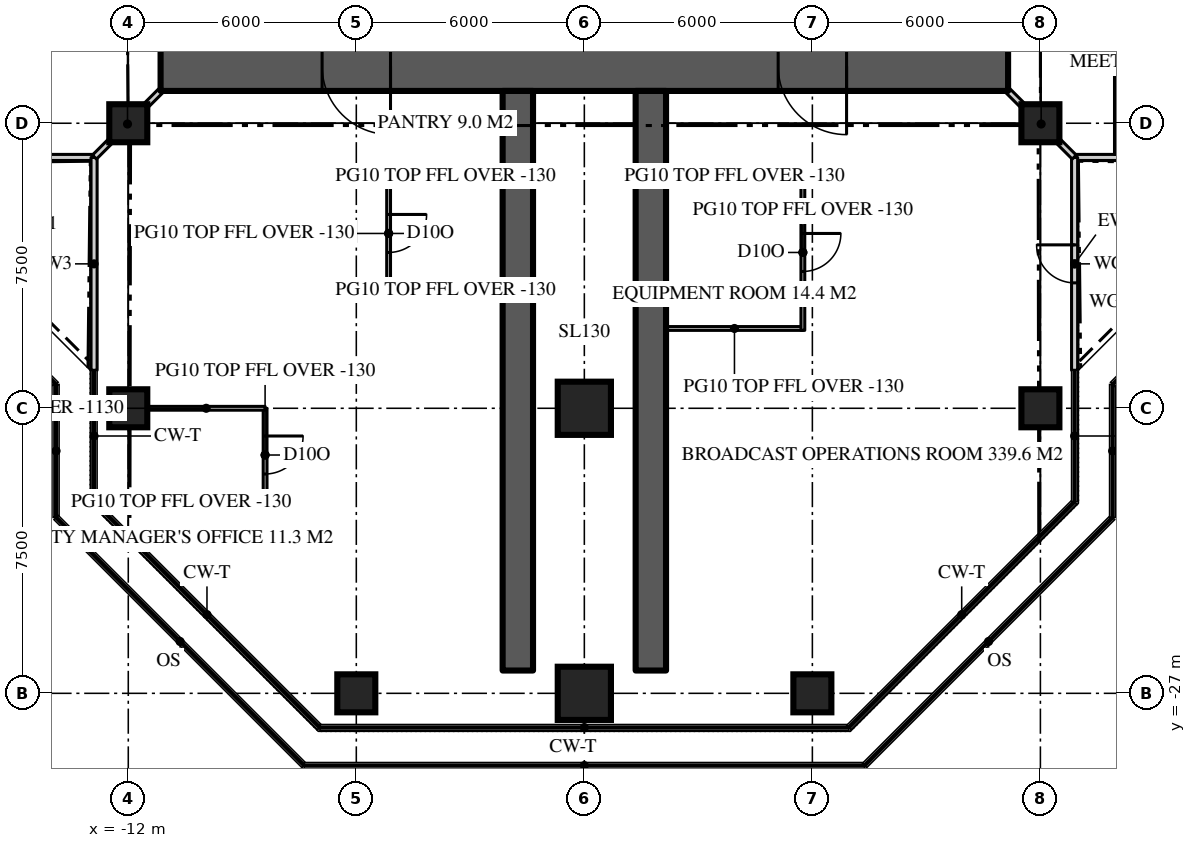
"""IFC4 building model, lengths in metres.
Left out: names, types, materials, properties, quantities, classifications, styles, units other than length and angle.
Written with IfcOpenShell. Run it as: python <this file> out.ifc"""

import sys

from ifc_helpers import new_model, si_unit, direction, frame, frame_2d, origin, origin_2d, place, context, subcontext, project, spatial, rectangle, extrude, element, fill, save


model = new_model("IFC4")
c1 = context("Model", 3, precision=1e-05, world=origin(), true_north=direction((0.0, 1.0)))
c2 = subcontext(c1, "Body", "Model", "MODEL_VIEW")
j1 = project(units=[si_unit("LENGTHUNIT", "METRE"), si_unit("PLANEANGLEUNIT", "RADIAN")], contexts=[c1])
p1 = place(None, origin())
s1 = spatial("IfcSite", under=j1, at=p1, CompositionType="ELEMENT")
p2 = place(p1, origin())
s2 = spatial("IfcBuilding", under=s1, at=p2, CompositionType="ELEMENT")
p3 = place(p2, frame((0.0, 0.0, 267.3)))
s3 = spatial("IfcBuildingStorey", under=s2, at=p3, CompositionType="ELEMENT", Elevation=267.3)
p4 = place(p3, frame((11.15, -10.5, 0.0), z_axis=(0.0, 0.0, 1.0), x_axis=(-1.0, 0.0, 0.0)))
e1 = element("IfcWall", 1, at=p4, inside=s3, PredefinedType="SHEAR", context=c2, shape_type="SweptSolid", body=[
    extrude(rectangle(XDim=22.3, YDim=1.3, at=frame_2d((11.15, 0.0))), origin(), (0.0, 0.0, 1.0), 3.9),
])
p5 = place(p4, frame((16.25, 0.0, 0.0)))
e2 = element("IfcOpeningElement", 2, at=p5, cuts=e1, PredefinedType="OPENING", context=c2, shape_type="SweptSolid", body=[
    extrude(rectangle(XDim=1.8, YDim=2.2, at=frame_2d((0.9, 1.1))), frame((0.0, 0.66, 0.0), z_axis=(0.0, -1.0, 0.0), x_axis=(1.0, 0.0, 0.0)), (0.0, 0.0, 1.0), 1.32),
])
p6 = place(p4, frame((4.25, 0.0, 0.0)))
e3 = element("IfcOpeningElement", 3, at=p6, cuts=e1, PredefinedType="OPENING", context=c2, shape_type="SweptSolid", body=[
    extrude(rectangle(XDim=1.8, YDim=2.2, at=frame_2d((0.9, 1.1))), frame((0.0, 0.66, 0.0), z_axis=(0.0, -1.0, 0.0), x_axis=(1.0, 0.0, 0.0)), (0.0, 0.0, 1.0), 1.32),
])
for number, where, z_axis, x_axis in (
    (4, (-1.75, -11.15, 0.0), (0.0, 0.0, 1.0), (0.0, -1.0, 0.0)),
    (5, (1.75, -11.15, 0.0), (0.0, 0.0, 1.0), (0.0, -1.0, 0.0)),
):
    element("IfcWall", number, at=place(p3, frame(where, z_axis=z_axis, x_axis=x_axis)), inside=s3, PredefinedType="SHEAR", context=c2, shape_type="SweptSolid", body=[
        extrude(rectangle(XDim=15.25, YDim=0.8, at=frame_2d((7.625, 0.0))), origin(), (0.0, 0.0, 1.0), 3.9),
    ])
p7 = place(p3, frame((-6.0, -27.0, 0.0), z_axis=(0.0, 0.0, 1.0), x_axis=(1.0, 0.0, 0.0)))
e6 = element("IfcColumn", 6, at=p7, inside=s3, PredefinedType="COLUMN", context=c2, shape_type="SweptSolid", body=[
    extrude(rectangle(XDim=1.0, YDim=1.0, at=origin_2d()), origin(), (0.0, 0.0, 1.0), 3.9),
])
p8 = place(p3, frame((0.0, -27.0, 0.0), z_axis=(0.0, 0.0, 1.0), x_axis=(1.0, 0.0, 0.0)))
e7 = element("IfcColumn", 7, at=p8, inside=s3, PredefinedType="COLUMN", context=c2, shape_type="SweptSolid", body=[
    extrude(rectangle(XDim=1.4, YDim=1.4, at=origin_2d()), origin(), (0.0, 0.0, 1.0), 3.9),
])
for number, where, z_axis, x_axis in (
    (8, (6.0, -27.0, 0.0), (0.0, 0.0, 1.0), (1.0, 0.0, 0.0)),
    (9, (-12.0, -19.5, 0.0), (0.0, 0.0, 1.0), (1.0, 0.0, 0.0)),
):
    element("IfcColumn", number, at=place(p3, frame(where, z_axis=z_axis, x_axis=x_axis)), inside=s3, PredefinedType="COLUMN", context=c2, shape_type="SweptSolid", body=[
        extrude(rectangle(XDim=1.0, YDim=1.0, at=origin_2d()), origin(), (0.0, 0.0, 1.0), 3.9),
    ])
p9 = place(p3, frame((0.0, -19.5, 0.0), z_axis=(0.0, 0.0, 1.0), x_axis=(1.0, 0.0, 0.0)))
e10 = element("IfcColumn", 10, at=p9, inside=s3, PredefinedType="COLUMN", context=c2, shape_type="SweptSolid", body=[
    extrude(rectangle(XDim=1.4, YDim=1.4, at=origin_2d()), origin(), (0.0, 0.0, 1.0), 3.9),
])
for number, where, z_axis, x_axis in (
    (11, (12.0, -19.5, 0.0), (0.0, 0.0, 1.0), (1.0, 0.0, 0.0)),
    (12, (-12.0, -12.0, 0.0), (0.0, 0.0, 1.0), (1.0, 0.0, 0.0)),
    (13, (12.0, -12.0, 0.0), (0.0, 0.0, 1.0), (1.0, 0.0, 0.0)),
):
    element("IfcColumn", number, at=place(p3, frame(where, z_axis=z_axis, x_axis=x_axis)), inside=s3, PredefinedType="COLUMN", context=c2, shape_type="SweptSolid", body=[
        extrude(rectangle(XDim=1.0, YDim=1.0, at=origin_2d()), origin(), (0.0, 0.0, 1.0), 3.9),
    ])
p10 = place(p3, frame((12.9, -12.9, 0.0), z_axis=(0.0, 0.0, 1.0), x_axis=(1.0, 0.0, 0.0)))
e14 = element("IfcWall", 14, at=p10, inside=s3, PredefinedType="SOLIDWALL", context=c2, shape_type="SweptSolid", body=[
    extrude(rectangle(XDim=5.6, YDim=0.16, at=frame_2d((2.8, 0.0))), origin(), (0.0, 0.0, 1.0), 3.77),
])
p11 = place(p3, frame((-18.5, -12.9, 0.0), z_axis=(0.0, 0.0, 1.0), x_axis=(1.0, 0.0, 0.0)))
e15 = element("IfcWall", 15, at=p11, inside=s3, PredefinedType="SOLIDWALL", context=c2, shape_type="SweptSolid", body=[
    extrude(rectangle(XDim=5.6, YDim=0.16, at=frame_2d((2.8, 0.0))), origin(), (0.0, 0.0, 1.0), 3.77),
])
p12 = place(p11, frame((2.3, 0.0, 0.0)))
e16 = element("IfcOpeningElement", 16, at=p12, cuts=e15, PredefinedType="OPENING", context=c2, shape_type="SweptSolid", body=[
    extrude(rectangle(XDim=1.0, YDim=2.2, at=frame_2d((0.5, 1.1))), frame((0.0, 0.09, 0.0), z_axis=(0.0, -1.0, 0.0), x_axis=(1.0, 0.0, 0.0)), (0.0, 0.0, 1.0), 0.18),
])
p13 = place(p3, frame((-12.9, -12.9, 0.0), z_axis=(0.0, 0.0, 1.0), x_axis=(0.0, -1.0, 0.0)))
e17 = element("IfcWall", 17, at=p13, inside=s3, PredefinedType="SOLIDWALL", context=c2, shape_type="SweptSolid", body=[
    extrude(rectangle(XDim=5.6, YDim=0.16, at=frame_2d((2.8, 0.0))), origin(), (0.0, 0.0, 1.0), 3.77),
])
p14 = place(p3, frame((12.9, -18.5, 0.0), z_axis=(0.0, 0.0, 1.0), x_axis=(0.0, 1.0, 0.0)))
e18 = element("IfcWall", 18, at=p14, inside=s3, PredefinedType="SOLIDWALL", context=c2, shape_type="SweptSolid", body=[
    extrude(rectangle(XDim=5.6, YDim=0.16, at=frame_2d((2.8, 0.0))), origin(), (0.0, 0.0, 1.0), 3.77),
])
p15 = place(p14, frame((2.3, 0.0, 0.0)))
e19 = element("IfcOpeningElement", 19, at=p15, cuts=e18, PredefinedType="OPENING", context=c2, shape_type="SweptSolid", body=[
    extrude(rectangle(XDim=1.0, YDim=2.2, at=frame_2d((0.5, 1.1))), frame((0.0, 0.09, 0.0), z_axis=(0.0, -1.0, 0.0), x_axis=(1.0, 0.0, 0.0)), (0.0, 0.0, 1.0), 0.18),
])
p16 = place(p3, frame((14.0, -4.0, 0.0), z_axis=(0.0, 0.0, 1.0), x_axis=(0.0, -1.0, 0.0)))
e20 = element("IfcWall", 20, at=p16, inside=s3, PredefinedType="PARTITIONING", context=c2, shape_type="SweptSolid", body=[
    extrude(rectangle(XDim=8.82, YDim=0.1, at=frame_2d((4.41, 0.0))), origin(), (0.0, 0.0, 1.0), 3.18),
])
p17 = place(p3, frame((-8.4, -19.5, 0.0), z_axis=(0.0, 0.0, 1.0), x_axis=(0.0, -1.0, 0.0)))
e21 = element("IfcWall", 21, at=p17, inside=s3, PredefinedType="PARTITIONING", context=c2, shape_type="SweptSolid", body=[
    extrude(rectangle(XDim=2.459, YDim=0.1, at=frame_2d((1.229, 0.0))), origin(), (0.0, 0.0, 1.0), 3.77),
])
p18 = place(p17, frame((0.729, 0.0, 0.0)))
e22 = element("IfcOpeningElement", 22, at=p18, cuts=e21, PredefinedType="OPENING", context=c2, shape_type="SweptSolid", body=[
    extrude(rectangle(XDim=1.0, YDim=2.2, at=frame_2d((0.5, 1.1))), frame((0.0, 0.06, 0.0), z_axis=(0.0, -1.0, 0.0), x_axis=(1.0, 0.0, 0.0)), (0.0, 0.0, 1.0), 0.12),
])
p19 = place(p3, frame((-8.4, -19.5, 0.0), z_axis=(0.0, 0.0, 1.0), x_axis=(-1.0, 0.0, 0.0)))
e23 = element("IfcWall", 23, at=p19, inside=s3, PredefinedType="PARTITIONING", context=c2, shape_type="SweptSolid", body=[
    extrude(rectangle(XDim=3.1, YDim=0.1, at=frame_2d((1.55, 0.0))), origin(), (0.0, 0.0, 1.0), 2.77),
])
p20 = place(p3, frame((-8.4, -21.959, 0.0), z_axis=(0.0, 0.0, 1.0), x_axis=(-1.0, 0.0, 0.0)))
e24 = element("IfcWall", 24, at=p20, inside=s3, PredefinedType="PARTITIONING", context=c2, shape_type="SweptSolid", body=[
    extrude(rectangle(XDim=4.42, YDim=0.1, at=frame_2d((2.21, 0.0))), origin(), (0.0, 0.0, 1.0), 3.77),
])
for number, where, z_axis, x_axis in (
    (25, (2.15, -13.4, 0.0), (0.0, 0.0, 1.0), (1.0, 0.0, 0.0)),
    (26, (2.15, -17.4, 0.0), (0.0, 0.0, 1.0), (1.0, 0.0, 0.0)),
):
    element("IfcWall", number, at=place(p3, frame(where, z_axis=z_axis, x_axis=x_axis)), inside=s3, PredefinedType="PARTITIONING", context=c2, shape_type="SweptSolid", body=[
        extrude(rectangle(XDim=3.6, YDim=0.1, at=frame_2d((1.8, 0.0))), origin(), (0.0, 0.0, 1.0), 3.77),
    ])
p21 = place(p3, frame((5.75, -13.35, 0.0), z_axis=(0.0, 0.0, 1.0), x_axis=(0.0, -1.0, 0.0)))
e27 = element("IfcWall", 27, at=p21, inside=s3, PredefinedType="PARTITIONING", context=c2, shape_type="SweptSolid", body=[
    extrude(rectangle(XDim=4.1, YDim=0.1, at=frame_2d((2.05, 0.0))), origin(), (0.0, 0.0, 1.0), 3.77),
])
p22 = place(p21, frame((1.55, 0.0, 0.0)))
e28 = element("IfcOpeningElement", 28, at=p22, cuts=e27, PredefinedType="OPENING", context=c2, shape_type="SweptSolid", body=[
    extrude(rectangle(XDim=1.0, YDim=2.2, at=frame_2d((0.5, 1.1))), frame((0.0, 0.06, 0.0), z_axis=(0.0, -1.0, 0.0), x_axis=(1.0, 0.0, 0.0)), (0.0, 0.0, 1.0), 0.12),
])
for number, where, z_axis, x_axis in (
    (29, (-2.15, -13.4, 0.0), (0.0, 0.0, 1.0), (-1.0, 0.0, 0.0)),
    (30, (-2.15, -16.4, 0.0), (0.0, 0.0, 1.0), (-1.0, 0.0, 0.0)),
):
    element("IfcWall", number, at=place(p3, frame(where, z_axis=z_axis, x_axis=x_axis)), inside=s3, PredefinedType="PARTITIONING", context=c2, shape_type="SweptSolid", body=[
        extrude(rectangle(XDim=3.0, YDim=0.1, at=frame_2d((1.5, 0.0))), origin(), (0.0, 0.0, 1.0), 3.77),
    ])
p23 = place(p3, frame((-5.15, -13.35, 0.0), z_axis=(0.0, 0.0, 1.0), x_axis=(0.0, -1.0, 0.0)))
e31 = element("IfcWall", 31, at=p23, inside=s3, PredefinedType="PARTITIONING", context=c2, shape_type="SweptSolid", body=[
    extrude(rectangle(XDim=3.1, YDim=0.1, at=frame_2d((1.55, 0.0))), origin(), (0.0, 0.0, 1.0), 3.77),
])
p24 = place(p23, frame((1.05, 0.0, 0.0)))
e32 = element("IfcOpeningElement", 32, at=p24, cuts=e31, PredefinedType="OPENING", context=c2, shape_type="SweptSolid", body=[
    extrude(rectangle(XDim=1.0, YDim=2.2, at=frame_2d((0.5, 1.1))), frame((0.0, 0.06, 0.0), z_axis=(0.0, -1.0, 0.0), x_axis=(1.0, 0.0, 0.0)), (0.0, 0.0, 1.0), 0.12),
])
for number, where, z_axis, x_axis in (
    (33, (-11.15, -11.15, 0.0), (0.0, 0.0, 1.0), (-0.707, -0.707, 0.0)),
    (34, (11.15, -11.15, 0.0), (0.0, 0.0, 1.0), (0.707, -0.707, 0.0)),
):
    element("IfcWall", number, at=place(p3, frame(where, z_axis=z_axis, x_axis=x_axis)), inside=s3, PredefinedType="PARTITIONING", context=c2, shape_type="SweptSolid", body=[
        extrude(rectangle(XDim=2.461, YDim=0.15, at=frame_2d((1.23, 0.0))), origin(), (0.0, 0.0, 1.0), 3.22),
    ])
p25 = place(p15, origin())
e35 = element("IfcDoor", 35, at=p25, inside=s3, OperationType="SINGLE_SWING_RIGHT", PredefinedType="DOOR", context=c2, shape_type="SweptSolid", body=[
    extrude(rectangle(XDim=1.0, YDim=2.2, at=frame_2d((0.5, 1.1))), frame((0.0, 0.025, 0.0), z_axis=(0.0, -1.0, 0.0), x_axis=(1.0, 0.0, 0.0)), (0.0, 0.0, 1.0), 0.05),
])
fill(e19, e35)
p26 = place(p5, origin())
e36 = element("IfcDoor", 36, at=p26, inside=s3, OperationType="DOUBLE_DOOR_DOUBLE_SWING", PredefinedType="DOOR", context=c2, shape_type="SweptSolid", body=[
    extrude(rectangle(XDim=1.8, YDim=2.2, at=frame_2d((0.9, 1.1))), frame((0.0, 0.025, 0.0), z_axis=(0.0, -1.0, 0.0), x_axis=(1.0, 0.0, 0.0)), (0.0, 0.0, 1.0), 0.05),
])
fill(e2, e36)
p27 = place(p6, origin())
e37 = element("IfcDoor", 37, at=p27, inside=s3, OperationType="DOUBLE_DOOR_DOUBLE_SWING", PredefinedType="DOOR", context=c2, shape_type="SweptSolid", body=[
    extrude(rectangle(XDim=1.8, YDim=2.2, at=frame_2d((0.9, 1.1))), frame((0.0, 0.025, 0.0), z_axis=(0.0, -1.0, 0.0), x_axis=(1.0, 0.0, 0.0)), (0.0, 0.0, 1.0), 0.05),
])
fill(e3, e37)
p28 = place(p18, origin())
e38 = element("IfcDoor", 38, at=p28, inside=s3, OperationType="SINGLE_SWING_LEFT", PredefinedType="DOOR", context=c2, shape_type="SweptSolid", body=[
    extrude(rectangle(XDim=1.0, YDim=2.2, at=frame_2d((0.5, 1.1))), frame((0.0, 0.025, 0.0), z_axis=(0.0, -1.0, 0.0), x_axis=(1.0, 0.0, 0.0)), (0.0, 0.0, 1.0), 0.05),
])
fill(e22, e38)
p29 = place(p22, origin())
e39 = element("IfcDoor", 39, at=p29, inside=s3, OperationType="SINGLE_SWING_LEFT", PredefinedType="DOOR", context=c2, shape_type="SweptSolid", body=[
    extrude(rectangle(XDim=1.0, YDim=2.2, at=frame_2d((0.5, 1.1))), frame((0.0, 0.025, 0.0), z_axis=(0.0, -1.0, 0.0), x_axis=(1.0, 0.0, 0.0)), (0.0, 0.0, 1.0), 0.05),
])
fill(e28, e39)
p30 = place(p24, origin())
e40 = element("IfcDoor", 40, at=p30, inside=s3, OperationType="SINGLE_SWING_LEFT", PredefinedType="DOOR", context=c2, shape_type="SweptSolid", body=[
    extrude(rectangle(XDim=1.0, YDim=2.2, at=frame_2d((0.5, 1.1))), frame((0.0, 0.025, 0.0), z_axis=(0.0, -1.0, 0.0), x_axis=(1.0, 0.0, 0.0)), (0.0, 0.0, 1.0), 0.05),
])
fill(e32, e40)
save(model, sys.argv[1])
